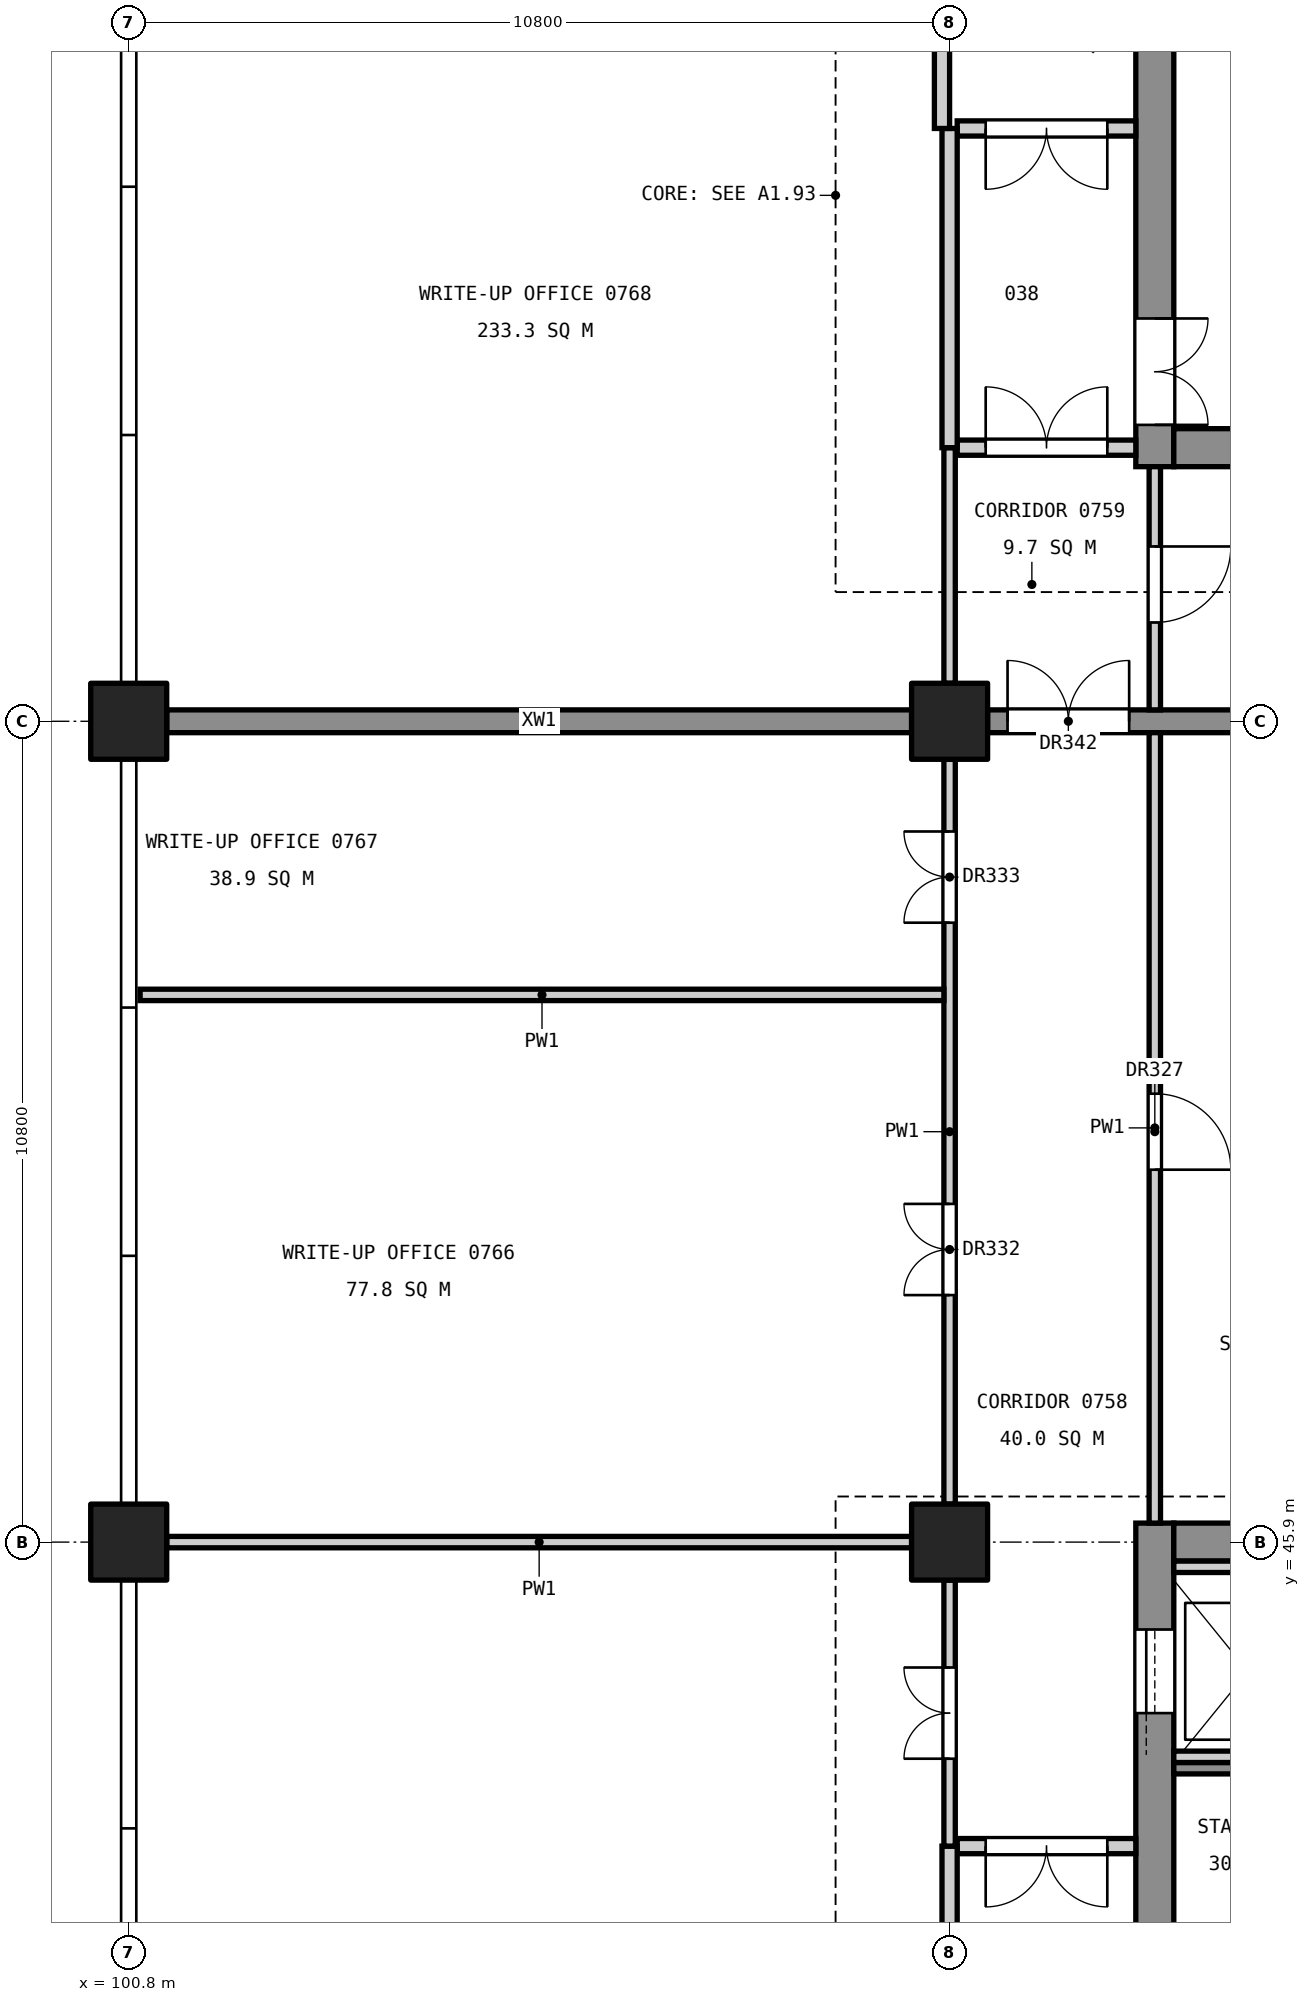
"""IFC4 building model, lengths in metres.
Left out: names, types, materials, properties, quantities, classifications, styles, units other than length and angle.
Written with IfcOpenShell. Run it as: python <this file> out.ifc"""

import sys

from ifc_helpers import new_model, si_unit, direction, frame, frame_2d, origin, origin_2d, place, context, subcontext, project, spatial, rectangle, extrude, element, fill, save


model = new_model("IFC4")
c1 = context("Model", 3, precision=1e-05, world=origin(), true_north=direction((0.0, 1.0)))
c2 = subcontext(c1, "Body", "Model", "MODEL_VIEW")
j1 = project(units=[si_unit("LENGTHUNIT", "METRE"), si_unit("PLANEANGLEUNIT", "RADIAN")], contexts=[c1])
p1 = place(None, origin())
s1 = spatial("IfcSite", under=j1, at=p1, CompositionType="ELEMENT")
p2 = place(p1, origin())
s2 = spatial("IfcBuilding", under=s1, at=p2, CompositionType="ELEMENT")
p3 = place(p2, frame((0.0, 0.0, 36.6)))
s3 = spatial("IfcBuildingStorey", under=s2, at=p3, CompositionType="ELEMENT", Elevation=36.6)
for number, where, z_axis, x_axis in (
    (1, (111.6, 45.9, 0.0), (0.0, 0.0, 1.0), (1.0, 0.0, 0.0)),
    (2, (111.6, 56.7, 0.0), (0.0, 0.0, 1.0), (1.0, 0.0, 0.0)),
    (3, (100.8, 45.9, 0.0), (0.0, 0.0, 1.0), (1.0, 0.0, 0.0)),
    (4, (100.8, 56.7, 0.0), (0.0, 0.0, 1.0), (1.0, 0.0, 0.0)),
):
    element("IfcColumn", number, at=place(p3, frame(where, z_axis=z_axis, x_axis=x_axis)), inside=s3, PredefinedType="COLUMN", context=c2, shape_type="SweptSolid", body=[
        extrude(rectangle(XDim=1.0, YDim=1.0, at=origin_2d()), origin(), (0.0, 0.0, 1.0), 4.8),
    ])
p4 = place(p3, frame((114.3, 34.85, 0.0), z_axis=(0.0, 0.0, 1.0), x_axis=(0.0, 1.0, 0.0)))
e5 = element("IfcWall", 5, at=p4, inside=s3, PredefinedType="SHEAR", context=c2, shape_type="SweptSolid", body=[
    extrude(rectangle(XDim=11.3, YDim=0.5, at=frame_2d((5.65, 0.0))), origin(), (0.0, 0.0, 1.0), 4.55),
])
p5 = place(p4, frame((0.55, 0.0, 0.0)))
e6 = element("IfcOpeningElement", 6, at=p5, cuts=e5, PredefinedType="OPENING", context=c2, shape_type="SweptSolid", body=[
    extrude(rectangle(XDim=1.4, YDim=2.1, at=frame_2d((0.7, 1.05))), frame((0.0, 0.26, 0.0), z_axis=(0.0, -1.0, 0.0), x_axis=(1.0, 0.0, 0.0)), (0.0, 0.0, 1.0), 0.52),
])
p6 = place(p4, frame((8.8, 0.0, 0.0)))
e7 = element("IfcOpeningElement", 7, at=p6, cuts=e5, PredefinedType="OPENING", context=c2, shape_type="SweptSolid", body=[
    extrude(rectangle(XDim=1.1, YDim=2.1, at=frame_2d((0.55, 1.05))), frame((0.0, 0.26, 0.0), z_axis=(0.0, -1.0, 0.0), x_axis=(1.0, 0.0, 0.0)), (0.0, 0.0, 1.0), 0.52),
])
p7 = place(p3, frame((118.55, 45.9, 0.0), z_axis=(0.0, 0.0, 1.0), x_axis=(-1.0, 0.0, 0.0)))
e8 = element("IfcWall", 8, at=p7, inside=s3, PredefinedType="SHEAR", context=c2, shape_type="SweptSolid", body=[
    extrude(rectangle(XDim=4.0, YDim=0.5, at=frame_2d((2.0, 0.0))), origin(), (0.0, 0.0, 1.0), 4.55),
])
p8 = place(p3, frame((114.3, 60.05, 0.0), z_axis=(0.0, 0.0, 1.0), x_axis=(0.0, 1.0, 0.0)))
e9 = element("IfcWall", 9, at=p8, inside=s3, PredefinedType="SHEAR", context=c2, shape_type="SweptSolid", body=[
    extrude(rectangle(XDim=14.9, YDim=0.5, at=frame_2d((7.45, 0.0))), origin(), (0.0, 0.0, 1.0), 4.55),
])
p9 = place(p8, frame((0.55, 0.0, 0.0)))
e10 = element("IfcOpeningElement", 10, at=p9, cuts=e9, PredefinedType="OPENING", context=c2, shape_type="SweptSolid", body=[
    extrude(rectangle(XDim=1.4, YDim=2.1, at=frame_2d((0.7, 1.05))), frame((0.0, 0.26, 0.0), z_axis=(0.0, -1.0, 0.0), x_axis=(1.0, 0.0, 0.0)), (0.0, 0.0, 1.0), 0.52),
])
p10 = place(p8, frame((8.85, 0.0, 0.0)))
e11 = element("IfcOpeningElement", 11, at=p10, cuts=e9, PredefinedType="OPENING", context=c2, shape_type="SweptSolid", body=[
    extrude(rectangle(XDim=1.1, YDim=2.1, at=frame_2d((0.55, 1.05))), frame((0.0, 0.26, 0.0), z_axis=(0.0, -1.0, 0.0), x_axis=(1.0, 0.0, 0.0)), (0.0, 0.0, 1.0), 0.52),
])
p11 = place(p8, frame((11.4, 0.0, 0.0)))
e12 = element("IfcOpeningElement", 12, at=p11, cuts=e9, PredefinedType="OPENING", context=c2, shape_type="SweptSolid", body=[
    extrude(rectangle(XDim=1.1, YDim=2.1, at=frame_2d((0.55, 1.05))), frame((0.0, 0.26, 0.0), z_axis=(0.0, -1.0, 0.0), x_axis=(1.0, 0.0, 0.0)), (0.0, 0.0, 1.0), 0.52),
])
p12 = place(p3, frame((118.55, 60.3, 0.0), z_axis=(0.0, 0.0, 1.0), x_axis=(-1.0, 0.0, 0.0)))
e13 = element("IfcWall", 13, at=p12, inside=s3, PredefinedType="SHEAR", context=c2, shape_type="SweptSolid", body=[
    extrude(rectangle(XDim=4.0, YDim=0.5, at=frame_2d((2.0, 0.0))), origin(), (0.0, 0.0, 1.0), 4.55),
])
p13 = place(p3, frame((118.3, 56.7, 0.0), z_axis=(0.0, 0.0, 1.0), x_axis=(-1.0, 0.0, 0.0)))
e14 = element("IfcWall", 14, at=p13, inside=s3, PredefinedType="SHEAR", context=c2, shape_type="SweptSolid", body=[
    extrude(rectangle(XDim=6.2, YDim=0.3, at=frame_2d((3.1, 0.0))), origin(), (0.0, 0.0, 1.0), 4.55),
])
p14 = place(p13, frame((4.337, 0.0, 0.0)))
e15 = element("IfcOpeningElement", 15, at=p14, cuts=e14, PredefinedType="OPENING", context=c2, shape_type="SweptSolid", body=[
    extrude(rectangle(XDim=1.6, YDim=2.1, at=frame_2d((0.8, 1.05))), frame((0.0, 0.16, 0.0), z_axis=(0.0, -1.0, 0.0), x_axis=(1.0, 0.0, 0.0)), (0.0, 0.0, 1.0), 0.32),
])
p15 = place(p3, frame((111.1, 56.7, 0.0), z_axis=(0.0, 0.0, 1.0), x_axis=(-1.0, 0.0, 0.0)))
e16 = element("IfcWall", 16, at=p15, inside=s3, PredefinedType="SHEAR", context=c2, shape_type="SweptSolid", body=[
    extrude(rectangle(XDim=9.8, YDim=0.3, at=frame_2d((4.9, 0.0))), origin(), (0.0, 0.0, 1.0), 4.55),
])
p16 = place(p3, frame((118.55, 42.925, 0.0), z_axis=(0.0, 0.0, 1.0), x_axis=(-1.0, 0.0, 0.0)))
e17 = element("IfcWall", 17, at=p16, inside=s3, PredefinedType="SOLIDWALL", context=c2, shape_type="SweptSolid", body=[
    extrude(rectangle(XDim=4.0, YDim=0.15, at=frame_2d((2.0, 0.0))), origin(), (0.0, 0.0, 1.0), 4.55),
])
for number, where, z_axis, x_axis in (
    (18, (116.35, 43.075, 0.0), (0.0, 0.0, 1.0), (-1.0, 0.0, 0.0)),
    (19, (116.35, 45.575, 0.0), (0.0, 0.0, 1.0), (-1.0, 0.0, 0.0)),
):
    element("IfcWall", number, at=place(p3, frame(where, z_axis=z_axis, x_axis=x_axis)), inside=s3, PredefinedType="SOLIDWALL", context=c2, shape_type="SweptSolid", body=[
        extrude(rectangle(XDim=1.8, YDim=0.15, at=frame_2d((0.9, 0.0))), origin(), (0.0, 0.0, 1.0), 4.8),
    ])
p17 = place(p3, frame((114.3, 46.15, 0.0), z_axis=(0.0, 0.0, 1.0), x_axis=(0.0, 1.0, 0.0)))
e20 = element("IfcWall", 20, at=p17, inside=s3, PredefinedType="PARTITIONING", context=c2, shape_type="SweptSolid", body=[
    extrude(rectangle(XDim=10.4, YDim=0.15, at=frame_2d((5.2, 0.0))), origin(), (0.0, 0.0, 1.0), 3.55),
])
p18 = place(p17, frame((4.65, 0.0, 0.0)))
e21 = element("IfcOpeningElement", 21, at=p18, cuts=e20, PredefinedType="OPENING", context=c2, shape_type="SweptSolid", body=[
    extrude(rectangle(XDim=1.0, YDim=2.1, at=frame_2d((0.5, 1.05))), frame((0.0, 0.085, 0.0), z_axis=(0.0, -1.0, 0.0), x_axis=(1.0, 0.0, 0.0)), (0.0, 0.0, 1.0), 0.17),
])
p19 = place(p3, frame((114.3, 56.85, 0.0), z_axis=(0.0, 0.0, 1.0), x_axis=(0.0, 1.0, 0.0)))
e22 = element("IfcWall", 22, at=p19, inside=s3, PredefinedType="PARTITIONING", context=c2, shape_type="SweptSolid", body=[
    extrude(rectangle(XDim=3.2, YDim=0.15, at=frame_2d((1.6, 0.0))), origin(), (0.0, 0.0, 1.0), 3.55),
])
p20 = place(p19, frame((1.15, 0.0, 0.0)))
e23 = element("IfcOpeningElement", 23, at=p20, cuts=e22, PredefinedType="OPENING", context=c2, shape_type="SweptSolid", body=[
    extrude(rectangle(XDim=1.0, YDim=2.1, at=frame_2d((0.5, 1.05))), frame((0.0, 0.085, 0.0), z_axis=(0.0, -1.0, 0.0), x_axis=(1.0, 0.0, 0.0)), (0.0, 0.0, 1.0), 0.17),
])
p21 = place(p3, frame((114.05, 41.9, 0.0), z_axis=(0.0, 0.0, 1.0), x_axis=(-1.0, 0.0, 0.0)))
e24 = element("IfcWall", 24, at=p21, inside=s3, PredefinedType="PARTITIONING", context=c2, shape_type="SweptSolid", body=[
    extrude(rectangle(XDim=2.35, YDim=0.2, at=frame_2d((1.175, 0.0))), origin(), (0.0, 0.0, 1.0), 3.55),
])
p22 = place(p21, frame((0.375, 0.0, 0.0)))
e25 = element("IfcOpeningElement", 25, at=p22, cuts=e24, PredefinedType="OPENING", context=c2, shape_type="SweptSolid", body=[
    extrude(rectangle(XDim=1.6, YDim=2.1, at=frame_2d((0.8, 1.05))), frame((0.0, 0.11, 0.0), z_axis=(0.0, -1.0, 0.0), x_axis=(1.0, 0.0, 0.0)), (0.0, 0.0, 1.0), 0.22),
])
p23 = place(p3, frame((114.05, 60.3, 0.0), z_axis=(0.0, 0.0, 1.0), x_axis=(-1.0, 0.0, 0.0)))
e26 = element("IfcWall", 26, at=p23, inside=s3, PredefinedType="PARTITIONING", context=c2, shape_type="SweptSolid", body=[
    extrude(rectangle(XDim=2.35, YDim=0.2, at=frame_2d((1.175, 0.0))), origin(), (0.0, 0.0, 1.0), 3.85),
])
p24 = place(p23, frame((0.375, 0.0, 0.0)))
e27 = element("IfcOpeningElement", 27, at=p24, cuts=e26, PredefinedType="OPENING", context=c2, shape_type="SweptSolid", body=[
    extrude(rectangle(XDim=1.6, YDim=2.1, at=frame_2d((0.8, 1.05))), frame((0.0, 0.11, 0.0), z_axis=(0.0, -1.0, 0.0), x_axis=(1.0, 0.0, 0.0)), (0.0, 0.0, 1.0), 0.22),
])
p25 = place(p3, frame((114.05, 64.5, 0.0), z_axis=(0.0, 0.0, 1.0), x_axis=(-1.0, 0.0, 0.0)))
e28 = element("IfcWall", 28, at=p25, inside=s3, PredefinedType="PARTITIONING", context=c2, shape_type="SweptSolid", body=[
    extrude(rectangle(XDim=2.35, YDim=0.2, at=frame_2d((1.175, 0.0))), origin(), (0.0, 0.0, 1.0), 3.55),
])
p26 = place(p25, frame((0.375, 0.0, 0.0)))
e29 = element("IfcOpeningElement", 29, at=p26, cuts=e28, PredefinedType="OPENING", context=c2, shape_type="SweptSolid", body=[
    extrude(rectangle(XDim=1.6, YDim=2.1, at=frame_2d((0.8, 1.05))), frame((0.0, 0.11, 0.0), z_axis=(0.0, -1.0, 0.0), x_axis=(1.0, 0.0, 0.0)), (0.0, 0.0, 1.0), 0.22),
])
p27 = place(p3, frame((111.6, 35.6, 0.0), z_axis=(0.0, 0.0, 1.0), x_axis=(0.0, 1.0, 0.0)))
e30 = element("IfcWall", 30, at=p27, inside=s3, PredefinedType="PARTITIONING", context=c2, shape_type="SweptSolid", body=[
    extrude(rectangle(XDim=6.3, YDim=0.2, at=frame_2d((3.15, 0.0))), origin(), (0.0, 0.0, 1.0), 3.55),
])
p28 = place(p3, frame((111.6, 41.9, 0.0), z_axis=(0.0, 0.0, 1.0), x_axis=(0.0, 1.0, 0.0)))
e31 = element("IfcWall", 31, at=p28, inside=s3, PredefinedType="PARTITIONING", context=c2, shape_type="SweptSolid", body=[
    extrude(rectangle(XDim=3.5, YDim=0.15, at=frame_2d((1.75, 0.0))), origin(), (0.0, 0.0, 1.0), 3.55),
])
p29 = place(p28, frame((1.15, 0.0, 0.0)))
e32 = element("IfcOpeningElement", 32, at=p29, cuts=e31, PredefinedType="OPENING", context=c2, shape_type="SweptSolid", body=[
    extrude(rectangle(XDim=1.2, YDim=2.1, at=frame_2d((0.6, 1.05))), frame((0.0, 0.085, 0.0), z_axis=(0.0, -1.0, 0.0), x_axis=(1.0, 0.0, 0.0)), (0.0, 0.0, 1.0), 0.17),
])
p30 = place(p3, frame((111.6, 46.4, 0.0), z_axis=(0.0, 0.0, 1.0), x_axis=(0.0, 1.0, 0.0)))
e33 = element("IfcWall", 33, at=p30, inside=s3, PredefinedType="PARTITIONING", context=c2, shape_type="SweptSolid", body=[
    extrude(rectangle(XDim=9.8, YDim=0.15, at=frame_2d((4.9, 0.0))), origin(), (0.0, 0.0, 1.0), 3.55),
])
p31 = place(p30, frame((2.75, 0.0, 0.0)))
e34 = element("IfcOpeningElement", 34, at=p31, cuts=e33, PredefinedType="OPENING", context=c2, shape_type="SweptSolid", body=[
    extrude(rectangle(XDim=1.2, YDim=2.1, at=frame_2d((0.6, 1.05))), frame((0.0, 0.085, 0.0), z_axis=(0.0, -1.0, 0.0), x_axis=(1.0, 0.0, 0.0)), (0.0, 0.0, 1.0), 0.17),
])
p32 = place(p30, frame((7.65, 0.0, 0.0)))
e35 = element("IfcOpeningElement", 35, at=p32, cuts=e33, PredefinedType="OPENING", context=c2, shape_type="SweptSolid", body=[
    extrude(rectangle(XDim=1.2, YDim=2.1, at=frame_2d((0.6, 1.05))), frame((0.0, 0.085, 0.0), z_axis=(0.0, -1.0, 0.0), x_axis=(1.0, 0.0, 0.0)), (0.0, 0.0, 1.0), 0.17),
])
p33 = place(p3, frame((111.6, 57.2, 0.0), z_axis=(0.0, 0.0, 1.0), x_axis=(0.0, 1.0, 0.0)))
e36 = element("IfcWall", 36, at=p33, inside=s3, PredefinedType="PARTITIONING", context=c2, shape_type="SweptSolid", body=[
    extrude(rectangle(XDim=3.1, YDim=0.15, at=frame_2d((1.55, 0.0))), origin(), (0.0, 0.0, 1.0), 3.55),
])
p34 = place(p3, frame((111.6, 60.3, 0.0), z_axis=(0.0, 0.0, 1.0), x_axis=(0.0, 1.0, 0.0)))
e37 = element("IfcWall", 37, at=p34, inside=s3, PredefinedType="PARTITIONING", context=c2, shape_type="SweptSolid", body=[
    extrude(rectangle(XDim=4.2, YDim=0.2, at=frame_2d((2.1, 0.0))), origin(), (0.0, 0.0, 1.0), 3.55),
])
p35 = place(p3, frame((111.5, 64.5, 0.0), z_axis=(0.0, 0.0, 1.0), x_axis=(0.0, 1.0, 0.0)))
e38 = element("IfcWall", 38, at=p35, inside=s3, PredefinedType="PARTITIONING", context=c2, shape_type="SweptSolid", body=[
    extrude(rectangle(XDim=2.5, YDim=0.2, at=frame_2d((1.25, 0.0))), origin(), (0.0, 0.0, 1.0), 3.55),
])
p36 = place(p3, frame((111.1, 45.9, 0.0), z_axis=(0.0, 0.0, 1.0), x_axis=(-1.0, 0.0, 0.0)))
e39 = element("IfcWall", 39, at=p36, inside=s3, PredefinedType="PARTITIONING", context=c2, shape_type="SweptSolid", body=[
    extrude(rectangle(XDim=9.8, YDim=0.15, at=frame_2d((4.9, 0.0))), origin(), (0.0, 0.0, 1.0), 3.85),
])
p37 = place(p3, frame((111.525, 53.1, 0.0), z_axis=(0.0, 0.0, 1.0), x_axis=(-1.0, 0.0, 0.0)))
e40 = element("IfcWall", 40, at=p37, inside=s3, PredefinedType="PARTITIONING", context=c2, shape_type="SweptSolid", body=[
    extrude(rectangle(XDim=10.575, YDim=0.15, at=frame_2d((5.288, 0.0))), origin(), (0.0, 0.0, 1.0), 3.85),
])
p38 = place(p9, frame((1.4, 0.0, 0.0), z_axis=(0.0, 0.0, 1.0), x_axis=(-1.0, 0.0, 0.0)))
e41 = element("IfcDoor", 41, at=p38, inside=s3, OperationType="DOUBLE_DOOR_SINGLE_SWING", PredefinedType="DOOR", context=c2, shape_type="SweptSolid", body=[
    extrude(rectangle(XDim=1.4, YDim=2.1, at=frame_2d((0.7, 1.05))), frame((0.0, 0.025, 0.0), z_axis=(0.0, -1.0, 0.0), x_axis=(1.0, 0.0, 0.0)), (0.0, 0.0, 1.0), 0.05),
])
fill(e10, e41)
p39 = place(p6, origin())
e42 = element("IfcDoor", 42, at=p39, inside=s3, OperationType="SLIDING_TO_LEFT", PredefinedType="DOOR", context=c2, shape_type="SweptSolid", body=[
    extrude(rectangle(XDim=1.1, YDim=2.1, at=frame_2d((0.55, 1.05))), frame((0.0, 0.025, 0.0), z_axis=(0.0, -1.0, 0.0), x_axis=(1.0, 0.0, 0.0)), (0.0, 0.0, 1.0), 0.05),
])
fill(e7, e42)
p40 = place(p18, frame((1.0, 0.0, 0.0), z_axis=(0.0, 0.0, 1.0), x_axis=(-1.0, 0.0, 0.0)))
e43 = element("IfcDoor", 43, at=p40, inside=s3, OperationType="SINGLE_SWING_RIGHT", PredefinedType="DOOR", context=c2, shape_type="SweptSolid", body=[
    extrude(rectangle(XDim=1.0, YDim=2.1, at=frame_2d((0.5, 1.05))), frame((0.0, 0.025, 0.0), z_axis=(0.0, -1.0, 0.0), x_axis=(1.0, 0.0, 0.0)), (0.0, 0.0, 1.0), 0.05),
])
fill(e21, e43)
p41 = place(p20, frame((1.0, 0.0, 0.0), z_axis=(0.0, 0.0, 1.0), x_axis=(-1.0, 0.0, 0.0)))
e44 = element("IfcDoor", 44, at=p41, inside=s3, OperationType="SINGLE_SWING_LEFT", PredefinedType="DOOR", context=c2, shape_type="SweptSolid", body=[
    extrude(rectangle(XDim=1.0, YDim=2.1, at=frame_2d((0.5, 1.05))), frame((0.0, 0.025, 0.0), z_axis=(0.0, -1.0, 0.0), x_axis=(1.0, 0.0, 0.0)), (0.0, 0.0, 1.0), 0.05),
])
fill(e23, e44)
p42 = place(p29, origin())
e45 = element("IfcDoor", 45, at=p42, inside=s3, OperationType="DOUBLE_DOOR_SINGLE_SWING", PredefinedType="DOOR", context=c2, shape_type="SweptSolid", body=[
    extrude(rectangle(XDim=1.2, YDim=2.1, at=frame_2d((0.6, 1.05))), frame((0.0, 0.025, 0.0), z_axis=(0.0, -1.0, 0.0), x_axis=(1.0, 0.0, 0.0)), (0.0, 0.0, 1.0), 0.05),
])
fill(e32, e45)
p43 = place(p31, origin())
e46 = element("IfcDoor", 46, at=p43, inside=s3, OperationType="DOUBLE_DOOR_SINGLE_SWING", PredefinedType="DOOR", context=c2, shape_type="SweptSolid", body=[
    extrude(rectangle(XDim=1.2, YDim=2.1, at=frame_2d((0.6, 1.05))), frame((0.0, 0.025, 0.0), z_axis=(0.0, -1.0, 0.0), x_axis=(1.0, 0.0, 0.0)), (0.0, 0.0, 1.0), 0.05),
])
fill(e34, e46)
p44 = place(p32, origin())
e47 = element("IfcDoor", 47, at=p44, inside=s3, OperationType="DOUBLE_DOOR_SINGLE_SWING", PredefinedType="DOOR", context=c2, shape_type="SweptSolid", body=[
    extrude(rectangle(XDim=1.2, YDim=2.1, at=frame_2d((0.6, 1.05))), frame((0.0, 0.025, 0.0), z_axis=(0.0, -1.0, 0.0), x_axis=(1.0, 0.0, 0.0)), (0.0, 0.0, 1.0), 0.05),
])
fill(e35, e47)
p45 = place(p22, origin())
e48 = element("IfcDoor", 48, at=p45, inside=s3, OperationType="DOUBLE_DOOR_SINGLE_SWING", PredefinedType="DOOR", context=c2, shape_type="SweptSolid", body=[
    extrude(rectangle(XDim=1.6, YDim=2.1, at=frame_2d((0.8, 1.05))), frame((0.0, 0.025, 0.0), z_axis=(0.0, -1.0, 0.0), x_axis=(1.0, 0.0, 0.0)), (0.0, 0.0, 1.0), 0.05),
])
fill(e25, e48)
p46 = place(p24, frame((1.6, 0.0, 0.0), z_axis=(0.0, 0.0, 1.0), x_axis=(-1.0, 0.0, 0.0)))
e49 = element("IfcDoor", 49, at=p46, inside=s3, OperationType="DOUBLE_DOOR_SINGLE_SWING", PredefinedType="DOOR", context=c2, shape_type="SweptSolid", body=[
    extrude(rectangle(XDim=1.6, YDim=2.1, at=frame_2d((0.8, 1.05))), frame((0.0, 0.025, 0.0), z_axis=(0.0, -1.0, 0.0), x_axis=(1.0, 0.0, 0.0)), (0.0, 0.0, 1.0), 0.05),
])
fill(e27, e49)
p47 = place(p26, origin())
e50 = element("IfcDoor", 50, at=p47, inside=s3, OperationType="DOUBLE_DOOR_SINGLE_SWING", PredefinedType="DOOR", context=c2, shape_type="SweptSolid", body=[
    extrude(rectangle(XDim=1.6, YDim=2.1, at=frame_2d((0.8, 1.05))), frame((0.0, 0.025, 0.0), z_axis=(0.0, -1.0, 0.0), x_axis=(1.0, 0.0, 0.0)), (0.0, 0.0, 1.0), 0.05),
])
fill(e29, e50)
p48 = place(p14, frame((1.6, 0.0, 0.0), z_axis=(0.0, 0.0, 1.0), x_axis=(-1.0, 0.0, 0.0)))
e51 = element("IfcDoor", 51, at=p48, inside=s3, OperationType="DOUBLE_DOOR_SINGLE_SWING", PredefinedType="DOOR", context=c2, shape_type="SweptSolid", body=[
    extrude(rectangle(XDim=1.6, YDim=2.1, at=frame_2d((0.8, 1.05))), frame((0.0, 0.025, 0.0), z_axis=(0.0, -1.0, 0.0), x_axis=(1.0, 0.0, 0.0)), (0.0, 0.0, 1.0), 0.05),
])
fill(e15, e51)
save(model, sys.argv[1])
